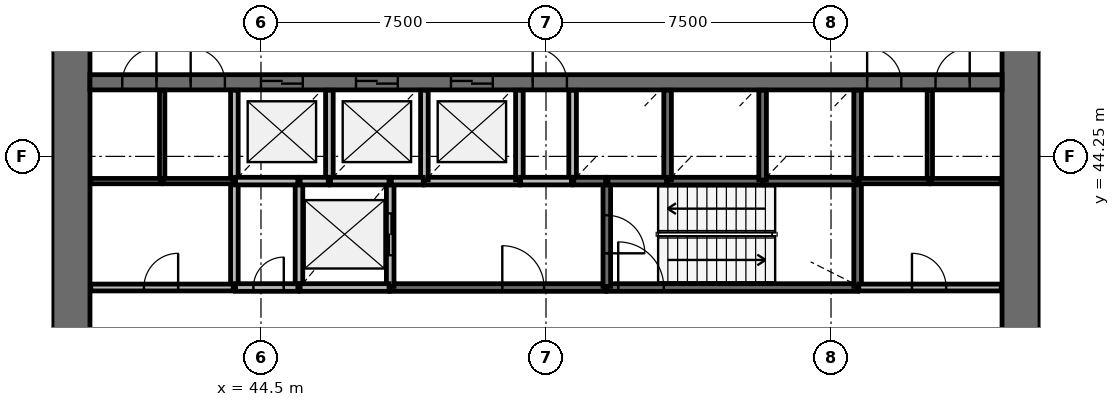
"""IFC4 building model, lengths in metres.
Left out: names, types, materials, properties, quantities, classifications, styles, units other than length and angle.
Written with IfcOpenShell. Run it as: python <this file> out.ifc"""

import sys

from ifc_helpers import new_model, si_unit, direction, frame, frame_2d, origin, place, context, subcontext, project, spatial, rectangle, extrude, source, transform, mapped, element, fill, save


model = new_model("IFC4")
c1 = context("Model", 3, precision=1e-05, world=origin(), true_north=direction((0.0, 1.0)))
c2 = subcontext(c1, "Body", "Model", "MODEL_VIEW")
j1 = project(units=[si_unit("LENGTHUNIT", "METRE"), si_unit("PLANEANGLEUNIT", "RADIAN")], contexts=[c1])
p1 = place(None, origin())
s1 = spatial("IfcSite", under=j1, at=p1, CompositionType="ELEMENT")
p2 = place(p1, origin())
s2 = spatial("IfcBuilding", under=s1, at=p2, CompositionType="ELEMENT")
p3 = place(p2, frame((0.0, 0.0, 57.8)))
s3 = spatial("IfcBuildingStorey", under=s2, at=p3, CompositionType="ELEMENT", Elevation=57.8)
p4 = place(p3, frame((64.5, 38.0, 0.0), z_axis=(0.0, 0.0, 1.0), x_axis=(0.0, 1.0, 0.0)))
e1 = element("IfcWall", 1, at=p4, inside=s3, PredefinedType="SHEAR", context=c2, shape_type="SweptSolid", body=[
    extrude(rectangle(XDim=20.0, YDim=1.0, at=frame_2d((10.0, 0.0))), origin(), (0.0, 0.0, 1.0), 4.4),
])
p5 = place(p4, frame((9.1, 0.0, 0.0)))
e2 = element("IfcOpeningElement", 2, at=p5, cuts=e1, PredefinedType="OPENING", context=c2, shape_type="SweptSolid", body=[
    extrude(rectangle(XDim=1.8, YDim=2.1, at=frame_2d((0.9, 1.05))), frame((0.0, 0.51, 0.0), z_axis=(0.0, -1.0, 0.0), x_axis=(1.0, 0.0, 0.0)), (0.0, 0.0, 1.0), 1.02),
])
p6 = place(p3, frame((39.5, 58.0, 0.0), z_axis=(0.0, 0.0, 1.0), x_axis=(0.0, -1.0, 0.0)))
e3 = element("IfcWall", 3, at=p6, inside=s3, PredefinedType="SHEAR", context=c2, shape_type="SweptSolid", body=[
    extrude(rectangle(XDim=20.0, YDim=1.0, at=frame_2d((10.0, 0.0))), origin(), (0.0, 0.0, 1.0), 4.4),
])
p7 = place(p6, frame((9.1, 0.0, 0.0)))
e4 = element("IfcOpeningElement", 4, at=p7, cuts=e3, PredefinedType="OPENING", context=c2, shape_type="SweptSolid", body=[
    extrude(rectangle(XDim=1.8, YDim=2.1, at=frame_2d((0.9, 1.05))), frame((0.0, 0.51, 0.0), z_axis=(0.0, -1.0, 0.0), x_axis=(1.0, 0.0, 0.0)), (0.0, 0.0, 1.0), 1.02),
])
p8 = place(p3, frame((40.0, 46.2, 0.0), z_axis=(0.0, 0.0, 1.0), x_axis=(1.0, 0.0, 0.0)))
e5 = element("IfcWall", 5, at=p8, inside=s3, PredefinedType="SHEAR", context=c2, shape_type="SweptSolid", body=[
    extrude(rectangle(XDim=24.0, YDim=0.4, at=frame_2d((12.0, 0.0))), origin(), (0.0, 0.0, 1.0), 4.4),
])
p9 = place(p8, frame((4.5, 0.0, 0.0)))
e6 = element("IfcOpeningElement", 6, at=p9, cuts=e5, PredefinedType="OPENING", context=c2, shape_type="SweptSolid", body=[
    extrude(rectangle(XDim=1.1, YDim=2.1, at=frame_2d((0.55, 1.05))), frame((0.0, 0.21, 0.0), z_axis=(0.0, -1.0, 0.0), x_axis=(1.0, 0.0, 0.0)), (0.0, 0.0, 1.0), 0.42),
])
p10 = place(p8, frame((7.0, 0.0, 0.0)))
e7 = element("IfcOpeningElement", 7, at=p10, cuts=e5, PredefinedType="OPENING", context=c2, shape_type="SweptSolid", body=[
    extrude(rectangle(XDim=1.1, YDim=2.1, at=frame_2d((0.55, 1.05))), frame((0.0, 0.21, 0.0), z_axis=(0.0, -1.0, 0.0), x_axis=(1.0, 0.0, 0.0)), (0.0, 0.0, 1.0), 0.42),
])
p11 = place(p8, frame((9.5, 0.0, 0.0)))
e8 = element("IfcOpeningElement", 8, at=p11, cuts=e5, PredefinedType="OPENING", context=c2, shape_type="SweptSolid", body=[
    extrude(rectangle(XDim=1.1, YDim=2.1, at=frame_2d((0.55, 1.05))), frame((0.0, 0.21, 0.0), z_axis=(0.0, -1.0, 0.0), x_axis=(1.0, 0.0, 0.0)), (0.0, 0.0, 1.0), 0.42),
])
p12 = place(p8, frame((20.45, 0.0, 0.0)))
e9 = element("IfcOpeningElement", 9, at=p12, cuts=e5, PredefinedType="OPENING", context=c2, shape_type="SweptSolid", body=[
    extrude(rectangle(XDim=0.9, YDim=2.1, at=frame_2d((0.45, 1.05))), frame((0.0, 0.21, 0.0), z_axis=(0.0, -1.0, 0.0), x_axis=(1.0, 0.0, 0.0)), (0.0, 0.0, 1.0), 0.42),
])
p13 = place(p8, frame((22.25, 0.0, 0.0)))
e10 = element("IfcOpeningElement", 10, at=p13, cuts=e5, PredefinedType="OPENING", context=c2, shape_type="SweptSolid", body=[
    extrude(rectangle(XDim=0.9, YDim=2.1, at=frame_2d((0.45, 1.05))), frame((0.0, 0.21, 0.0), z_axis=(0.0, -1.0, 0.0), x_axis=(1.0, 0.0, 0.0)), (0.0, 0.0, 1.0), 0.42),
])
p14 = place(p8, frame((0.85, 0.0, 0.0)))
e11 = element("IfcOpeningElement", 11, at=p14, cuts=e5, PredefinedType="OPENING", context=c2, shape_type="SweptSolid", body=[
    extrude(rectangle(XDim=0.9, YDim=2.1, at=frame_2d((0.45, 1.05))), frame((0.0, 0.21, 0.0), z_axis=(0.0, -1.0, 0.0), x_axis=(1.0, 0.0, 0.0)), (0.0, 0.0, 1.0), 0.42),
])
p15 = place(p8, frame((2.65, 0.0, 0.0)))
e12 = element("IfcOpeningElement", 12, at=p15, cuts=e5, PredefinedType="OPENING", context=c2, shape_type="SweptSolid", body=[
    extrude(rectangle(XDim=0.9, YDim=2.1, at=frame_2d((0.45, 1.05))), frame((0.0, 0.21, 0.0), z_axis=(0.0, -1.0, 0.0), x_axis=(1.0, 0.0, 0.0)), (0.0, 0.0, 1.0), 0.42),
])
p16 = place(p8, frame((11.65, 0.0, 0.0)))
e13 = element("IfcOpeningElement", 13, at=p16, cuts=e5, PredefinedType="OPENING", context=c2, shape_type="SweptSolid", body=[
    extrude(rectangle(XDim=0.9, YDim=2.1, at=frame_2d((0.45, 1.05))), frame((0.0, 0.21, 0.0), z_axis=(0.0, -1.0, 0.0), x_axis=(1.0, 0.0, 0.0)), (0.0, 0.0, 1.0), 0.42),
])
p17 = place(p3, frame((53.6, 40.8, 0.0), z_axis=(0.0, 0.0, 1.0), x_axis=(1.0, 0.0, 0.0)))
e14 = element("IfcWall", 14, at=p17, inside=s3, PredefinedType="SOLIDWALL", context=c2, shape_type="SweptSolid", body=[
    extrude(rectangle(XDim=6.6, YDim=0.2, at=frame_2d((3.3, 0.0))), origin(), (0.0, 0.0, 1.0), 3.95),
])
p18 = place(p17, frame((0.3, 0.0, 0.0)))
e15 = element("IfcOpeningElement", 15, at=p18, cuts=e14, PredefinedType="OPENING", context=c2, shape_type="SweptSolid", body=[
    extrude(rectangle(XDim=1.2, YDim=2.1, at=frame_2d((0.6, 1.05))), frame((0.0, 0.11, 0.0), z_axis=(0.0, -1.0, 0.0), x_axis=(1.0, 0.0, 0.0)), (0.0, 0.0, 1.0), 0.22),
])
p19 = place(p3, frame((47.9, 40.8, 0.0), z_axis=(0.0, 0.0, 1.0), x_axis=(1.0, 0.0, 0.0)))
e16 = element("IfcWall", 16, at=p19, inside=s3, PredefinedType="SOLIDWALL", context=c2, shape_type="SweptSolid", body=[
    extrude(rectangle(XDim=5.67, YDim=0.2, at=frame_2d((2.835, 0.0))), origin(), (0.0, 0.0, 1.0), 3.95),
])
p20 = place(p19, frame((2.95, 0.0, 0.0)))
e17 = element("IfcOpeningElement", 17, at=p20, cuts=e16, PredefinedType="OPENING", context=c2, shape_type="SweptSolid", body=[
    extrude(rectangle(XDim=1.1, YDim=2.1, at=frame_2d((0.55, 1.05))), frame((0.0, 0.11, 0.0), z_axis=(0.0, -1.0, 0.0), x_axis=(1.0, 0.0, 0.0)), (0.0, 0.0, 1.0), 0.22),
])
for number, where, z_axis, x_axis in (
    (18, (43.8, 43.6, 0.0), (0.0, 0.0, 1.0), (0.0, -1.0, 0.0)),
    (19, (45.5, 43.6, 0.0), (0.0, 0.0, 1.0), (0.0, -1.0, 0.0)),
):
    element("IfcWall", number, at=place(p3, frame(where, z_axis=z_axis, x_axis=x_axis)), inside=s3, PredefinedType="SOLIDWALL", context=c2, shape_type="SweptSolid", body=[
        extrude(rectangle(XDim=2.8, YDim=0.2, at=frame_2d((1.4, 0.0))), origin(), (0.0, 0.0, 1.0), 3.95),
    ])
p21 = place(p3, frame((47.9, 40.83, 0.0), z_axis=(0.0, 0.0, 1.0), x_axis=(0.0, 1.0, 0.0)))
e20 = element("IfcWall", 20, at=p21, inside=s3, PredefinedType="SOLIDWALL", context=c2, shape_type="SweptSolid", body=[
    extrude(rectangle(XDim=2.77, YDim=0.2, at=frame_2d((1.385, 0.0))), origin(), (0.0, 0.0, 1.0), 3.95),
])
p22 = place(p21, frame((0.82, 0.0, 0.0)))
e21 = element("IfcOpeningElement", 21, at=p22, cuts=e20, PredefinedType="OPENING", context=c2, shape_type="SweptSolid", body=[
    extrude(rectangle(XDim=1.1, YDim=2.1, at=frame_2d((0.55, 1.05))), frame((0.0, 0.11, 0.0), z_axis=(0.0, -1.0, 0.0), x_axis=(1.0, 0.0, 0.0)), (0.0, 0.0, 1.0), 0.22),
])
p23 = place(p3, frame((60.2, 40.83, 0.0), z_axis=(0.0, 0.0, 1.0), x_axis=(0.0, 1.0, 0.0)))
e22 = element("IfcWall", 22, at=p23, inside=s3, PredefinedType="SOLIDWALL", context=c2, shape_type="SweptSolid", body=[
    extrude(rectangle(XDim=2.77, YDim=0.2, at=frame_2d((1.385, 0.0))), origin(), (0.0, 0.0, 1.0), 3.95),
])
p24 = place(p3, frame((53.6, 43.6, 0.0), z_axis=(0.0, 0.0, 1.0), x_axis=(0.0, -1.0, 0.0)))
e23 = element("IfcWall", 23, at=p24, inside=s3, PredefinedType="SOLIDWALL", context=c2, shape_type="SweptSolid", body=[
    extrude(rectangle(XDim=2.77, YDim=0.2, at=frame_2d((1.385, 0.0))), origin(), (0.0, 0.0, 1.0), 3.95),
])
p25 = place(p24, frame((0.9, 0.0, 0.0)))
e24 = element("IfcOpeningElement", 24, at=p25, cuts=e23, PredefinedType="OPENING", context=c2, shape_type="SweptSolid", body=[
    extrude(rectangle(XDim=1.0, YDim=2.1, at=frame_2d((0.5, 1.05))), frame((0.0, 0.11, 0.0), z_axis=(0.0, -1.0, 0.0), x_axis=(1.0, 0.0, 0.0)), (0.0, 0.0, 1.0), 0.22),
])
for number, where, z_axis, x_axis in (
    (25, (48.8, 43.6, 0.0), (0.0, 0.0, 1.0), (1.0, 0.0, 0.0)),
    (26, (55.2, 43.6, 0.0), (0.0, 0.0, 1.0), (1.0, 0.0, 0.0)),
):
    element("IfcWall", number, at=place(p3, frame(where, z_axis=z_axis, x_axis=x_axis)), inside=s3, PredefinedType="SOLIDWALL", context=c2, shape_type="SweptSolid", body=[
        extrude(rectangle(XDim=2.5, YDim=0.2, at=frame_2d((1.25, 0.0))), origin(), (0.0, 0.0, 1.0), 3.95),
    ])
p26 = place(p3, frame((57.73, 43.6, 0.0), z_axis=(0.0, 0.0, 1.0), x_axis=(1.0, 0.0, 0.0)))
e27 = element("IfcWall", 27, at=p26, inside=s3, PredefinedType="SOLIDWALL", context=c2, shape_type="SweptSolid", body=[
    extrude(rectangle(XDim=2.44, YDim=0.2, at=frame_2d((1.22, 0.0))), origin(), (0.0, 0.0, 1.0), 3.95),
])
p27 = place(p3, frame((45.53, 40.8, 0.0), z_axis=(0.0, 0.0, 1.0), x_axis=(1.0, 0.0, 0.0)))
e28 = element("IfcWall", 28, at=p27, inside=s3, PredefinedType="SOLIDWALL", context=c2, shape_type="SweptSolid", body=[
    extrude(rectangle(XDim=2.34, YDim=0.2, at=frame_2d((1.17, 0.0))), origin(), (0.0, 0.0, 1.0), 3.95),
])
p28 = place(p3, frame((43.8, 45.99, 0.0), z_axis=(0.0, 0.0, 1.0), x_axis=(0.0, -1.0, 0.0)))
e29 = element("IfcWall", 29, at=p28, inside=s3, PredefinedType="SOLIDWALL", context=c2, shape_type="SweptSolid", body=[
    extrude(rectangle(XDim=2.36, YDim=0.2, at=frame_2d((1.18, 0.0))), origin(), (0.0, 0.0, 1.0), 3.95),
])
p29 = place(p3, frame((46.3, 43.6, 0.0), z_axis=(0.0, 0.0, 1.0), x_axis=(0.0, 1.0, 0.0)))
e30 = element("IfcWall", 30, at=p29, inside=s3, PredefinedType="SOLIDWALL", context=c2, shape_type="SweptSolid", body=[
    extrude(rectangle(XDim=2.39, YDim=0.2, at=frame_2d((1.195, 0.0))), origin(), (0.0, 0.0, 1.0), 3.95),
])
for number, where, z_axis, x_axis in (
    (31, (48.8, 43.63, 0.0), (0.0, 0.0, 1.0), (0.0, 1.0, 0.0)),
    (32, (51.3, 43.63, 0.0), (0.0, 0.0, 1.0), (0.0, 1.0, 0.0)),
):
    element("IfcWall", number, at=place(p3, frame(where, z_axis=z_axis, x_axis=x_axis)), inside=s3, PredefinedType="SOLIDWALL", context=c2, shape_type="SweptSolid", body=[
        extrude(rectangle(XDim=2.36, YDim=0.2, at=frame_2d((1.18, 0.0))), origin(), (0.0, 0.0, 1.0), 3.95),
    ])
p30 = place(p3, frame((52.7, 45.99, 0.0), z_axis=(0.0, 0.0, 1.0), x_axis=(0.0, -1.0, 0.0)))
e33 = element("IfcWall", 33, at=p30, inside=s3, PredefinedType="SOLIDWALL", context=c2, shape_type="SweptSolid", body=[
    extrude(rectangle(XDim=2.39, YDim=0.2, at=frame_2d((1.195, 0.0))), origin(), (0.0, 0.0, 1.0), 3.95),
])
for number, where, z_axis, x_axis in (
    (34, (55.2, 43.63, 0.0), (0.0, 0.0, 1.0), (0.0, 1.0, 0.0)),
    (35, (57.7, 43.63, 0.0), (0.0, 0.0, 1.0), (0.0, 1.0, 0.0)),
    (36, (60.2, 43.63, 0.0), (0.0, 0.0, 1.0), (0.0, 1.0, 0.0)),
):
    element("IfcWall", number, at=place(p3, frame(where, z_axis=z_axis, x_axis=x_axis)), inside=s3, PredefinedType="SOLIDWALL", context=c2, shape_type="SweptSolid", body=[
        extrude(rectangle(XDim=2.36, YDim=0.2, at=frame_2d((1.18, 0.0))), origin(), (0.0, 0.0, 1.0), 3.95),
    ])
p31 = place(p3, frame((43.83, 43.6, 0.0), z_axis=(0.0, 0.0, 1.0), x_axis=(1.0, 0.0, 0.0)))
e37 = element("IfcWall", 37, at=p31, inside=s3, PredefinedType="SOLIDWALL", context=c2, shape_type="SweptSolid", body=[
    extrude(rectangle(XDim=1.64, YDim=0.2, at=frame_2d((0.82, 0.0))), origin(), (0.0, 0.0, 1.0), 3.95),
])
p32 = place(p3, frame((43.83, 40.8, 0.0), z_axis=(0.0, 0.0, 1.0), x_axis=(1.0, 0.0, 0.0)))
e38 = element("IfcWall", 38, at=p32, inside=s3, PredefinedType="SOLIDWALL", context=c2, shape_type="SweptSolid", body=[
    extrude(rectangle(XDim=1.64, YDim=0.2, at=frame_2d((0.82, 0.0))), origin(), (0.0, 0.0, 1.0), 3.95),
])
p33 = place(p32, frame((0.47, 0.0, 0.0)))
e39 = element("IfcOpeningElement", 39, at=p33, cuts=e38, PredefinedType="OPENING", context=c2, shape_type="SweptSolid", body=[
    extrude(rectangle(XDim=0.8, YDim=2.1, at=frame_2d((0.4, 1.05))), frame((0.0, 0.11, 0.0), z_axis=(0.0, -1.0, 0.0), x_axis=(1.0, 0.0, 0.0)), (0.0, 0.0, 1.0), 0.22),
])
for number, where, z_axis, x_axis in (
    (40, (46.33, 43.6, 0.0), (0.0, 0.0, 1.0), (1.0, 0.0, 0.0)),
    (41, (53.63, 43.6, 0.0), (0.0, 0.0, 1.0), (1.0, 0.0, 0.0)),
):
    element("IfcWall", number, at=place(p3, frame(where, z_axis=z_axis, x_axis=x_axis)), inside=s3, PredefinedType="SOLIDWALL", context=c2, shape_type="SweptSolid", body=[
        extrude(rectangle(XDim=1.54, YDim=0.2, at=frame_2d((0.77, 0.0))), origin(), (0.0, 0.0, 1.0), 3.95),
    ])
p34 = place(p3, frame((52.67, 43.6, 0.0), z_axis=(0.0, 0.0, 1.0), x_axis=(-1.0, 0.0, 0.0)))
e42 = element("IfcWall", 42, at=p34, inside=s3, PredefinedType="SOLIDWALL", context=c2, shape_type="SweptSolid", body=[
    extrude(rectangle(XDim=1.34, YDim=0.2, at=frame_2d((0.67, 0.0))), origin(), (0.0, 0.0, 1.0), 3.95),
])
for number, where, z_axis, x_axis in (
    (43, (47.93, 43.6, 0.0), (0.0, 0.0, 1.0), (1.0, 0.0, 0.0)),
    (44, (52.73, 43.6, 0.0), (0.0, 0.0, 1.0), (1.0, 0.0, 0.0)),
):
    element("IfcWall", number, at=place(p3, frame(where, z_axis=z_axis, x_axis=x_axis)), inside=s3, PredefinedType="SOLIDWALL", context=c2, shape_type="SweptSolid", body=[
        extrude(rectangle(XDim=0.84, YDim=0.2, at=frame_2d((0.42, 0.0))), origin(), (0.0, 0.0, 1.0), 3.95),
    ])
p35 = place(p3, frame((45.53, 43.6, 0.0), z_axis=(0.0, 0.0, 1.0), x_axis=(1.0, 0.0, 0.0)))
e45 = element("IfcWall", 45, at=p35, inside=s3, PredefinedType="SOLIDWALL", context=c2, shape_type="SweptSolid", body=[
    extrude(rectangle(XDim=0.74, YDim=0.2, at=frame_2d((0.37, 0.0))), origin(), (0.0, 0.0, 1.0), 3.95),
])
p36 = place(p3, frame((40.02, 40.8, 0.0), z_axis=(0.0, 0.0, 1.0), x_axis=(1.0, 0.0, 0.0)))
e46 = element("IfcWall", 46, at=p36, inside=s3, PredefinedType="PARTITIONING", context=c2, shape_type="SweptSolid", body=[
    extrude(rectangle(XDim=3.75, YDim=0.18, at=frame_2d((1.875, 0.0))), origin(), (0.0, 0.0, 1.0), 3.95),
])
p37 = place(p36, frame((1.4, 0.0, 0.0)))
e47 = element("IfcOpeningElement", 47, at=p37, cuts=e46, PredefinedType="OPENING", context=c2, shape_type="SweptSolid", body=[
    extrude(rectangle(XDim=0.9, YDim=2.1, at=frame_2d((0.45, 1.05))), frame((0.0, 0.1, 0.0), z_axis=(0.0, -1.0, 0.0), x_axis=(1.0, 0.0, 0.0)), (0.0, 0.0, 1.0), 0.2),
])
p38 = place(p3, frame((60.23, 40.8, 0.0), z_axis=(0.0, 0.0, 1.0), x_axis=(1.0, 0.0, 0.0)))
e48 = element("IfcWall", 48, at=p38, inside=s3, PredefinedType="PARTITIONING", context=c2, shape_type="SweptSolid", body=[
    extrude(rectangle(XDim=3.75, YDim=0.18, at=frame_2d((1.875, 0.0))), origin(), (0.0, 0.0, 1.0), 3.95),
])
p39 = place(p38, frame((1.4, 0.0, 0.0)))
e49 = element("IfcOpeningElement", 49, at=p39, cuts=e48, PredefinedType="OPENING", context=c2, shape_type="SweptSolid", body=[
    extrude(rectangle(XDim=0.9, YDim=2.1, at=frame_2d((0.45, 1.05))), frame((0.0, 0.1, 0.0), z_axis=(0.0, -1.0, 0.0), x_axis=(1.0, 0.0, 0.0)), (0.0, 0.0, 1.0), 0.2),
])
for number, where, z_axis, x_axis in (
    (50, (41.9, 43.6, 0.0), (0.0, 0.0, 1.0), (0.0, 1.0, 0.0)),
    (51, (62.1, 43.6, 0.0), (0.0, 0.0, 1.0), (0.0, 1.0, 0.0)),
):
    element("IfcWall", number, at=place(p3, frame(where, z_axis=z_axis, x_axis=x_axis)), inside=s3, PredefinedType="PARTITIONING", context=c2, shape_type="SweptSolid", body=[
        extrude(rectangle(XDim=2.39, YDim=0.14, at=frame_2d((1.195, 0.0))), origin(), (0.0, 0.0, 1.0), 3.05),
    ])
for number, where, z_axis, x_axis in (
    (52, (43.77, 43.6, 0.0), (0.0, 0.0, 1.0), (-1.0, 0.0, 0.0)),
    (53, (60.23, 43.6, 0.0), (0.0, 0.0, 1.0), (1.0, 0.0, 0.0)),
):
    element("IfcWall", number, at=place(p3, frame(where, z_axis=z_axis, x_axis=x_axis)), inside=s3, PredefinedType="PARTITIONING", context=c2, shape_type="SweptSolid", body=[
        extrude(rectangle(XDim=1.84, YDim=0.14, at=frame_2d((0.92, 0.0))), origin(), (0.0, 0.0, 1.0), 3.05),
    ])
for number, where, z_axis, x_axis in (
    (54, (41.87, 43.6, 0.0), (0.0, 0.0, 1.0), (-1.0, 0.0, 0.0)),
    (55, (62.13, 43.6, 0.0), (0.0, 0.0, 1.0), (1.0, 0.0, 0.0)),
):
    element("IfcWall", number, at=place(p3, frame(where, z_axis=z_axis, x_axis=x_axis)), inside=s3, PredefinedType="PARTITIONING", context=c2, shape_type="SweptSolid", body=[
        extrude(rectangle(XDim=1.85, YDim=0.14, at=frame_2d((0.925, 0.0))), origin(), (0.0, 0.0, 1.0), 3.05),
    ])
m1 = source(origin(), c2, "Body", "SweptSolid", [
    extrude(rectangle(XDim=1.1, YDim=2.1, at=frame_2d((0.55, 1.05))), frame((0.0, 0.025, 0.0), z_axis=(0.0, -1.0, 0.0), x_axis=(1.0, 0.0, 0.0)), (0.0, 0.0, 1.0), 0.05),
])
p40 = place(p9, origin())
e56 = element("IfcDoor", 56, at=p40, inside=s3, OperationType="DOUBLE_DOOR_SLIDING", PredefinedType="USERDEFINED", context=c2, shape_type="MappedRepresentation", body=[
    mapped(m1, transform((0.0, 0.0, 0.0), scale=1.0)),
])
fill(e6, e56)
p41 = place(p10, origin())
e57 = element("IfcDoor", 57, at=p41, inside=s3, OperationType="DOUBLE_DOOR_SLIDING", PredefinedType="USERDEFINED", context=c2, shape_type="MappedRepresentation", body=[
    mapped(m1, transform((0.0, 0.0, 0.0), scale=1.0)),
])
fill(e7, e57)
p42 = place(p11, origin())
e58 = element("IfcDoor", 58, at=p42, inside=s3, OperationType="DOUBLE_DOOR_SLIDING", PredefinedType="USERDEFINED", context=c2, shape_type="MappedRepresentation", body=[
    mapped(m1, transform((0.0, 0.0, 0.0), scale=1.0)),
])
fill(e8, e58)
p43 = place(p22, origin())
e59 = element("IfcDoor", 59, at=p43, inside=s3, OperationType="DOUBLE_DOOR_SLIDING", PredefinedType="USERDEFINED", context=c2, shape_type="MappedRepresentation", body=[
    mapped(m1, transform((0.0, 0.0, 0.0), scale=1.0)),
])
fill(e21, e59)
m2 = source(origin(), c2, "Body", "SweptSolid", [
    extrude(rectangle(XDim=1.2, YDim=2.1, at=frame_2d((0.6, 1.05))), frame((0.0, 0.025, 0.0), z_axis=(0.0, -1.0, 0.0), x_axis=(1.0, 0.0, 0.0)), (0.0, 0.0, 1.0), 0.05),
])
p44 = place(p18, origin())
e60 = element("IfcDoor", 60, at=p44, inside=s3, OperationType="SINGLE_SWING_LEFT", PredefinedType="DOOR", context=c2, shape_type="MappedRepresentation", body=[
    mapped(m2, transform((0.0, 0.0, 0.0), scale=1.0)),
])
fill(e15, e60)
m3 = source(origin(), c2, "Body", "SweptSolid", [
    extrude(rectangle(XDim=1.0, YDim=2.1, at=frame_2d((0.5, 1.05))), frame((0.0, 0.025, 0.0), z_axis=(0.0, -1.0, 0.0), x_axis=(1.0, 0.0, 0.0)), (0.0, 0.0, 1.0), 0.05),
])
p45 = place(p25, origin())
e61 = element("IfcDoor", 61, at=p45, inside=s3, OperationType="SINGLE_SWING_RIGHT", PredefinedType="DOOR", context=c2, shape_type="MappedRepresentation", body=[
    mapped(m3, transform((0.0, 0.0, 0.0), scale=1.0)),
])
fill(e24, e61)
m4 = source(origin(), c2, "Body", "SweptSolid", [
    extrude(rectangle(XDim=1.1, YDim=2.1, at=frame_2d((0.55, 1.05))), frame((0.0, 0.025, 0.0), z_axis=(0.0, -1.0, 0.0), x_axis=(1.0, 0.0, 0.0)), (0.0, 0.0, 1.0), 0.05),
])
p46 = place(p20, origin())
e62 = element("IfcDoor", 62, at=p46, inside=s3, OperationType="SINGLE_SWING_LEFT", PredefinedType="DOOR", context=c2, shape_type="MappedRepresentation", body=[
    mapped(m4, transform((0.0, 0.0, 0.0), scale=1.0)),
])
fill(e17, e62)
m5 = source(origin(), c2, "Body", "SweptSolid", [
    extrude(rectangle(XDim=0.8, YDim=2.1, at=frame_2d((0.4, 1.05))), frame((0.0, 0.025, 0.0), z_axis=(0.0, -1.0, 0.0), x_axis=(1.0, 0.0, 0.0)), (0.0, 0.0, 1.0), 0.05),
])
p47 = place(p33, origin())
e63 = element("IfcDoor", 63, at=p47, inside=s3, OperationType="SINGLE_SWING_RIGHT", PredefinedType="DOOR", context=c2, shape_type="MappedRepresentation", body=[
    mapped(m5, transform((0.0, 0.0, 0.0), scale=1.0)),
])
fill(e39, e63)
m6 = source(origin(), c2, "Body", "SweptSolid", [
    extrude(rectangle(XDim=0.9, YDim=2.1, at=frame_2d((0.45, 1.05))), frame((0.0, 0.025, 0.0), z_axis=(0.0, -1.0, 0.0), x_axis=(1.0, 0.0, 0.0)), (0.0, 0.0, 1.0), 0.05),
])
p48 = place(p37, origin())
e64 = element("IfcDoor", 64, at=p48, inside=s3, OperationType="SINGLE_SWING_RIGHT", PredefinedType="DOOR", context=c2, shape_type="MappedRepresentation", body=[
    mapped(m6, transform((0.0, 0.0, 0.0), scale=1.0)),
])
fill(e47, e64)
p49 = place(p12, origin())
e65 = element("IfcDoor", 65, at=p49, inside=s3, OperationType="SINGLE_SWING_LEFT", PredefinedType="DOOR", context=c2, shape_type="MappedRepresentation", body=[
    mapped(m6, transform((0.0, 0.0, 0.0), scale=1.0)),
])
fill(e9, e65)
p50 = place(p13, origin())
e66 = element("IfcDoor", 66, at=p50, inside=s3, OperationType="SINGLE_SWING_RIGHT", PredefinedType="DOOR", context=c2, shape_type="MappedRepresentation", body=[
    mapped(m6, transform((0.0, 0.0, 0.0), scale=1.0)),
])
fill(e10, e66)
p51 = place(p39, origin())
e67 = element("IfcDoor", 67, at=p51, inside=s3, OperationType="SINGLE_SWING_LEFT", PredefinedType="DOOR", context=c2, shape_type="MappedRepresentation", body=[
    mapped(m6, transform((0.0, 0.0, 0.0), scale=1.0)),
])
fill(e49, e67)
p52 = place(p14, origin())
e68 = element("IfcDoor", 68, at=p52, inside=s3, OperationType="SINGLE_SWING_RIGHT", PredefinedType="DOOR", context=c2, shape_type="MappedRepresentation", body=[
    mapped(m6, transform((0.0, 0.0, 0.0), scale=1.0)),
])
fill(e11, e68)
p53 = place(p15, origin())
e69 = element("IfcDoor", 69, at=p53, inside=s3, OperationType="SINGLE_SWING_LEFT", PredefinedType="DOOR", context=c2, shape_type="MappedRepresentation", body=[
    mapped(m6, transform((0.0, 0.0, 0.0), scale=1.0)),
])
fill(e12, e69)
p54 = place(p16, origin())
e70 = element("IfcDoor", 70, at=p54, inside=s3, OperationType="SINGLE_SWING_LEFT", PredefinedType="DOOR", context=c2, shape_type="MappedRepresentation", body=[
    mapped(m6, transform((0.0, 0.0, 0.0), scale=1.0)),
])
fill(e13, e70)
save(model, sys.argv[1])
